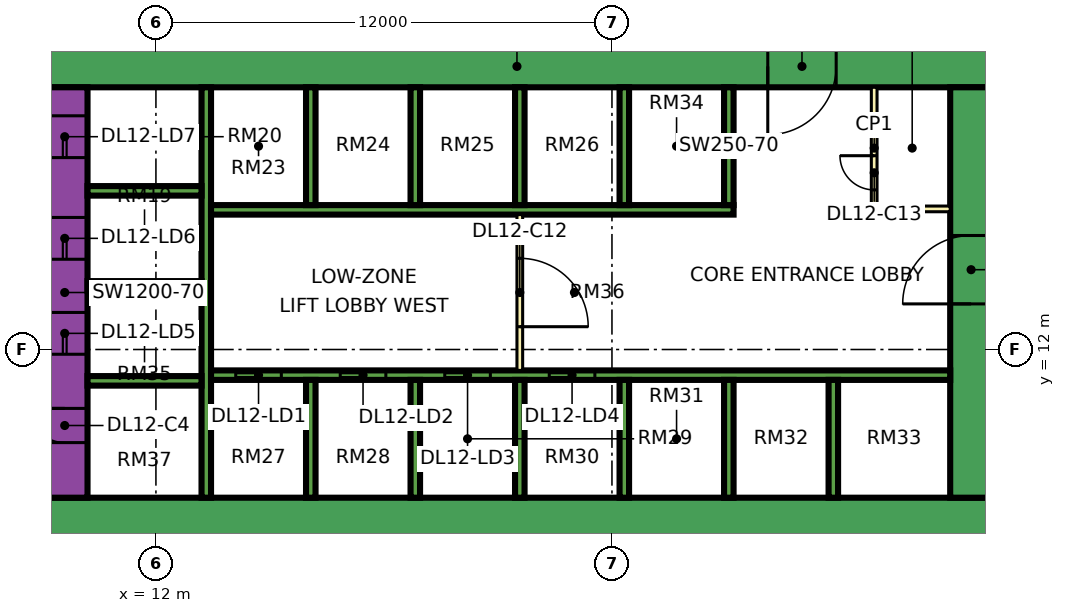
"""IFC4 building model, lengths in metres.
Left out: names, types, materials, properties, quantities, classifications, styles, units other than length and angle.
Written with IfcOpenShell. Run it as: python <this file> out.ifc"""

import sys

from ifc_helpers import new_model, si_unit, direction, frame, frame_2d, origin, place, context, subcontext, project, spatial, rectangle, extrude, element, fill, save


model = new_model("IFC4")
c1 = context("Model", 3, precision=1e-05, world=origin(), true_north=direction((0.0, 1.0)))
c2 = subcontext(c1, "Body", "Model", "MODEL_VIEW")
j1 = project(units=[si_unit("LENGTHUNIT", "METRE"), si_unit("PLANEANGLEUNIT", "RADIAN")], contexts=[c1])
p1 = place(None, origin())
s1 = spatial("IfcSite", under=j1, at=p1, CompositionType="ELEMENT")
p2 = place(p1, origin())
s2 = spatial("IfcBuilding", under=s1, at=p2, CompositionType="ELEMENT")
p3 = place(p2, frame((0.0, 0.0, 60.15)))
s3 = spatial("IfcBuildingStorey", under=s2, at=p3, CompositionType="ELEMENT", Elevation=60.15)
p4 = place(p3, frame((9.0, 7.55, 0.0), z_axis=(0.0, 0.0, 1.0), x_axis=(1.0, 0.0, 0.0)))
e1 = element("IfcWall", 1, at=p4, inside=s3, PredefinedType="SHEAR", context=c2, shape_type="SweptSolid", body=[
    extrude(rectangle(XDim=25.0, YDim=1.1, at=frame_2d((12.5, 0.0))), origin(), (0.0, 0.0, 1.0), 3.75),
])
p5 = place(p3, frame((9.0, 19.45, 0.0), z_axis=(0.0, 0.0, 1.0), x_axis=(1.0, 0.0, 0.0)))
e2 = element("IfcWall", 2, at=p5, inside=s3, PredefinedType="SHEAR", context=c2, shape_type="SweptSolid", body=[
    extrude(rectangle(XDim=25.0, YDim=1.1, at=frame_2d((12.5, 0.0))), origin(), (0.0, 0.0, 1.0), 3.75),
])
p6 = place(p5, frame((19.1, 0.0, 0.0)))
e3 = element("IfcOpeningElement", 3, at=p6, cuts=e2, PredefinedType="OPENING", context=c2, shape_type="SweptSolid", body=[
    extrude(rectangle(XDim=1.8, YDim=2.4, at=frame_2d((0.9, 1.2))), frame((0.0, 0.56, 0.0), z_axis=(0.0, -1.0, 0.0), x_axis=(1.0, 0.0, 0.0)), (0.0, 0.0, 1.0), 1.12),
])
p7 = place(p3, frame((9.6, 8.1, 0.0), z_axis=(0.0, 0.0, 1.0), x_axis=(0.0, 1.0, 0.0)))
e4 = element("IfcWall", 4, at=p7, inside=s3, PredefinedType="SHEAR", context=c2, shape_type="SweptSolid", body=[
    extrude(rectangle(XDim=10.8, YDim=1.2, at=frame_2d((5.4, 0.0))), origin(), (0.0, 0.0, 1.0), 3.75),
])
p8 = place(p7, frame((3.775, 0.0, 0.0)))
e5 = element("IfcOpeningElement", 5, at=p8, cuts=e4, PredefinedType="OPENING", context=c2, shape_type="SweptSolid", body=[
    extrude(rectangle(XDim=1.1, YDim=2.2, at=frame_2d((0.55, 1.1))), frame((0.0, 0.61, 0.0), z_axis=(0.0, -1.0, 0.0), x_axis=(1.0, 0.0, 0.0)), (0.0, 0.0, 1.0), 1.22),
])
p9 = place(p7, frame((6.275, 0.0, 0.0)))
e6 = element("IfcOpeningElement", 6, at=p9, cuts=e4, PredefinedType="OPENING", context=c2, shape_type="SweptSolid", body=[
    extrude(rectangle(XDim=1.1, YDim=2.2, at=frame_2d((0.55, 1.1))), frame((0.0, 0.61, 0.0), z_axis=(0.0, -1.0, 0.0), x_axis=(1.0, 0.0, 0.0)), (0.0, 0.0, 1.0), 1.22),
])
p10 = place(p7, frame((8.95, 0.0, 0.0)))
e7 = element("IfcOpeningElement", 7, at=p10, cuts=e4, PredefinedType="OPENING", context=c2, shape_type="SweptSolid", body=[
    extrude(rectangle(XDim=1.1, YDim=2.2, at=frame_2d((0.55, 1.1))), frame((0.0, 0.61, 0.0), z_axis=(0.0, -1.0, 0.0), x_axis=(1.0, 0.0, 0.0)), (0.0, 0.0, 1.0), 1.22),
])
p11 = place(p7, frame((1.45, 0.0, 0.0)))
e8 = element("IfcOpeningElement", 8, at=p11, cuts=e4, PredefinedType="OPENING", context=c2, shape_type="SweptSolid", body=[
    extrude(rectangle(XDim=0.9, YDim=2.1, at=frame_2d((0.45, 1.05))), frame((0.0, 0.61, 0.0), z_axis=(0.0, -1.0, 0.0), x_axis=(1.0, 0.0, 0.0)), (0.0, 0.0, 1.0), 1.22),
])
p12 = place(p3, frame((33.45, 8.1, 0.0), z_axis=(0.0, 0.0, 1.0), x_axis=(0.0, 1.0, 0.0)))
e9 = element("IfcWall", 9, at=p12, inside=s3, PredefinedType="SHEAR", context=c2, shape_type="SweptSolid", body=[
    extrude(rectangle(XDim=10.8, YDim=1.1, at=frame_2d((5.4, 0.0))), origin(), (0.0, 0.0, 1.0), 3.75),
])
p13 = place(p12, frame((5.1, 0.0, 0.0)))
e10 = element("IfcOpeningElement", 10, at=p13, cuts=e9, PredefinedType="OPENING", context=c2, shape_type="SweptSolid", body=[
    extrude(rectangle(XDim=1.8, YDim=2.4, at=frame_2d((0.9, 1.2))), frame((0.0, 0.56, 0.0), z_axis=(0.0, -1.0, 0.0), x_axis=(1.0, 0.0, 0.0)), (0.0, 0.0, 1.0), 1.12),
])
p14 = place(p3, frame((13.325, 8.1, 0.0), z_axis=(0.0, 0.0, 1.0), x_axis=(0.0, 1.0, 0.0)))
e11 = element("IfcWall", 11, at=p14, inside=s3, PredefinedType="SHEAR", context=c2, shape_type="SweptSolid", body=[
    extrude(rectangle(XDim=10.8, YDim=0.25, at=frame_2d((5.4, 0.0))), origin(), (0.0, 0.0, 1.0), 3.75),
])
p15 = place(p3, frame((13.45, 11.325, 0.0), z_axis=(0.0, 0.0, 1.0), x_axis=(1.0, 0.0, 0.0)))
e12 = element("IfcWall", 12, at=p15, inside=s3, PredefinedType="SHEAR", context=c2, shape_type="SweptSolid", body=[
    extrude(rectangle(XDim=19.45, YDim=0.25, at=frame_2d((9.725, 0.0))), origin(), (0.0, 0.0, 1.0), 3.75),
])
p16 = place(p15, frame((0.65, 0.0, 0.0)))
e13 = element("IfcOpeningElement", 13, at=p16, cuts=e12, PredefinedType="OPENING", context=c2, shape_type="SweptSolid", body=[
    extrude(rectangle(XDim=1.2, YDim=2.2, at=frame_2d((0.6, 1.1))), frame((0.0, 0.135, 0.0), z_axis=(0.0, -1.0, 0.0), x_axis=(1.0, 0.0, 0.0)), (0.0, 0.0, 1.0), 0.27),
])
p17 = place(p15, frame((3.4, 0.0, 0.0)))
e14 = element("IfcOpeningElement", 14, at=p17, cuts=e12, PredefinedType="OPENING", context=c2, shape_type="SweptSolid", body=[
    extrude(rectangle(XDim=1.2, YDim=2.2, at=frame_2d((0.6, 1.1))), frame((0.0, 0.135, 0.0), z_axis=(0.0, -1.0, 0.0), x_axis=(1.0, 0.0, 0.0)), (0.0, 0.0, 1.0), 0.27),
])
p18 = place(p15, frame((6.15, 0.0, 0.0)))
e15 = element("IfcOpeningElement", 15, at=p18, cuts=e12, PredefinedType="OPENING", context=c2, shape_type="SweptSolid", body=[
    extrude(rectangle(XDim=1.2, YDim=2.2, at=frame_2d((0.6, 1.1))), frame((0.0, 0.135, 0.0), z_axis=(0.0, -1.0, 0.0), x_axis=(1.0, 0.0, 0.0)), (0.0, 0.0, 1.0), 0.27),
])
p19 = place(p15, frame((8.9, 0.0, 0.0)))
e16 = element("IfcOpeningElement", 16, at=p19, cuts=e12, PredefinedType="OPENING", context=c2, shape_type="SweptSolid", body=[
    extrude(rectangle(XDim=1.2, YDim=2.2, at=frame_2d((0.6, 1.1))), frame((0.0, 0.135, 0.0), z_axis=(0.0, -1.0, 0.0), x_axis=(1.0, 0.0, 0.0)), (0.0, 0.0, 1.0), 0.27),
])
p20 = place(p3, frame((13.45, 15.675, 0.0), z_axis=(0.0, 0.0, 1.0), x_axis=(1.0, 0.0, 0.0)))
e17 = element("IfcWall", 17, at=p20, inside=s3, PredefinedType="SHEAR", context=c2, shape_type="SweptSolid", body=[
    extrude(rectangle(XDim=13.75, YDim=0.25, at=frame_2d((6.875, 0.0))), origin(), (0.0, 0.0, 1.0), 3.75),
])
for number, where, z_axis, x_axis in (
    (18, (10.2, 11.175, 0.0), (0.0, 0.0, 1.0), (1.0, 0.0, 0.0)),
    (19, (10.2, 13.675, 0.0), (0.0, 0.0, 1.0), (1.0, 0.0, 0.0)),
    (20, (10.2, 16.175, 0.0), (0.0, 0.0, 1.0), (1.0, 0.0, 0.0)),
):
    element("IfcWall", number, at=place(p3, frame(where, z_axis=z_axis, x_axis=x_axis)), inside=s3, PredefinedType="SHEAR", context=c2, shape_type="SweptSolid", body=[
        extrude(rectangle(XDim=3.0, YDim=0.25, at=frame_2d((1.5, 0.0))), origin(), (0.0, 0.0, 1.0), 3.75),
    ])
for number, where, z_axis, x_axis in (
    (21, (16.075, 8.1, 0.0), (0.0, 0.0, 1.0), (0.0, 1.0, 0.0)),
    (22, (18.825, 8.1, 0.0), (0.0, 0.0, 1.0), (0.0, 1.0, 0.0)),
    (23, (21.575, 8.1, 0.0), (0.0, 0.0, 1.0), (0.0, 1.0, 0.0)),
    (24, (24.325, 8.1, 0.0), (0.0, 0.0, 1.0), (0.0, 1.0, 0.0)),
    (25, (27.075, 8.1, 0.0), (0.0, 0.0, 1.0), (0.0, 1.0, 0.0)),
    (26, (29.825, 8.1, 0.0), (0.0, 0.0, 1.0), (0.0, 1.0, 0.0)),
    (27, (16.075, 15.8, 0.0), (0.0, 0.0, 1.0), (0.0, 1.0, 0.0)),
    (28, (18.825, 15.8, 0.0), (0.0, 0.0, 1.0), (0.0, 1.0, 0.0)),
    (29, (21.575, 15.8, 0.0), (0.0, 0.0, 1.0), (0.0, 1.0, 0.0)),
    (30, (24.325, 15.8, 0.0), (0.0, 0.0, 1.0), (0.0, 1.0, 0.0)),
    (31, (27.075, 15.8, 0.0), (0.0, 0.0, 1.0), (0.0, 1.0, 0.0)),
):
    element("IfcWall", number, at=place(p3, frame(where, z_axis=z_axis, x_axis=x_axis)), inside=s3, PredefinedType="SHEAR", context=c2, shape_type="SweptSolid", body=[
        extrude(rectangle(XDim=3.1, YDim=0.25, at=frame_2d((1.55, 0.0))), origin(), (0.0, 0.0, 1.0), 3.75),
    ])
p21 = place(p3, frame((-1.447, 12.553, 0.0), z_axis=(0.0, 0.0, 1.0), x_axis=(0.707106781187, -0.707106781187, 0.0)))
e32 = element("IfcWall", 32, at=p21, inside=s3, PredefinedType="SOLIDWALL", context=c2, shape_type="SweptSolid", body=[
    extrude(rectangle(XDim=19.799, YDim=0.15, at=frame_2d((9.899, 0.0))), origin(), (0.0, 0.0, 1.0), 3.35),
])
p22 = place(p21, frame((2.212, 0.0, 0.45)))
e33 = element("IfcOpeningElement", 33, at=p22, cuts=e32, PredefinedType="OPENING", context=c2, shape_type="SweptSolid", body=[
    extrude(rectangle(XDim=3.0, YDim=2.4, at=frame_2d((1.5, 1.2))), frame((0.0, 0.085, 0.0), z_axis=(0.0, -1.0, 0.0), x_axis=(1.0, 0.0, 0.0)), (0.0, 0.0, 1.0), 0.17),
])
p23 = place(p21, frame((10.216, 0.0, 0.45)))
e34 = element("IfcOpeningElement", 34, at=p23, cuts=e32, PredefinedType="OPENING", context=c2, shape_type="SweptSolid", body=[
    extrude(rectangle(XDim=3.0, YDim=2.4, at=frame_2d((1.5, 1.2))), frame((0.0, 0.085, 0.0), z_axis=(0.0, -1.0, 0.0), x_axis=(1.0, 0.0, 0.0)), (0.0, 0.0, 1.0), 0.17),
])
p24 = place(p3, frame((21.575, 11.45, 0.0), z_axis=(0.0, 0.0, 1.0), x_axis=(0.0, 1.0, 0.0)))
e35 = element("IfcWall", 35, at=p24, inside=s3, PredefinedType="PARTITIONING", context=c2, shape_type="SweptSolid", body=[
    extrude(rectangle(XDim=4.1, YDim=0.15, at=frame_2d((2.05, 0.0))), origin(), (0.0, 0.0, 1.0), 3.35),
])
p25 = place(p24, frame((1.15, 0.0, 0.0)))
e36 = element("IfcOpeningElement", 36, at=p25, cuts=e35, PredefinedType="OPENING", context=c2, shape_type="SweptSolid", body=[
    extrude(rectangle(XDim=1.8, YDim=2.4, at=frame_2d((0.9, 1.2))), frame((0.0, 0.085, 0.0), z_axis=(0.0, -1.0, 0.0), x_axis=(1.0, 0.0, 0.0)), (0.0, 0.0, 1.0), 0.17),
])
p26 = place(p3, frame((30.9, 15.7, 0.0), z_axis=(0.0, 0.0, 1.0), x_axis=(0.0, 1.0, 0.0)))
e37 = element("IfcWall", 37, at=p26, inside=s3, PredefinedType="PARTITIONING", context=c2, shape_type="SweptSolid", body=[
    extrude(rectangle(XDim=3.2, YDim=0.15, at=frame_2d((1.6, 0.0))), origin(), (0.0, 0.0, 1.0), 3.35),
])
p27 = place(p26, frame((0.5, 0.0, 0.0)))
e38 = element("IfcOpeningElement", 38, at=p27, cuts=e37, PredefinedType="OPENING", context=c2, shape_type="SweptSolid", body=[
    extrude(rectangle(XDim=0.9, YDim=2.1, at=frame_2d((0.45, 1.05))), frame((0.0, 0.085, 0.0), z_axis=(0.0, -1.0, 0.0), x_axis=(1.0, 0.0, 0.0)), (0.0, 0.0, 1.0), 0.17),
])
p28 = place(p3, frame((30.9, 15.7, 0.0), z_axis=(0.0, 0.0, 1.0), x_axis=(1.0, 0.0, 0.0)))
e39 = element("IfcWall", 39, at=p28, inside=s3, PredefinedType="PARTITIONING", context=c2, shape_type="SweptSolid", body=[
    extrude(rectangle(XDim=2.0, YDim=0.15, at=frame_2d((1.0, 0.0))), origin(), (0.0, 0.0, 1.0), 3.35),
])
p29 = place(p16, origin())
e40 = element("IfcDoor", 40, at=p29, inside=s3, OperationType="DOUBLE_DOOR_SLIDING", PredefinedType="DOOR", context=c2, shape_type="SweptSolid", body=[
    extrude(rectangle(XDim=1.2, YDim=2.2, at=frame_2d((0.6, 1.1))), frame((0.0, 0.025, 0.0), z_axis=(0.0, -1.0, 0.0), x_axis=(1.0, 0.0, 0.0)), (0.0, 0.0, 1.0), 0.05),
])
fill(e13, e40)
p30 = place(p17, origin())
e41 = element("IfcDoor", 41, at=p30, inside=s3, OperationType="DOUBLE_DOOR_SLIDING", PredefinedType="DOOR", context=c2, shape_type="SweptSolid", body=[
    extrude(rectangle(XDim=1.2, YDim=2.2, at=frame_2d((0.6, 1.1))), frame((0.0, 0.025, 0.0), z_axis=(0.0, -1.0, 0.0), x_axis=(1.0, 0.0, 0.0)), (0.0, 0.0, 1.0), 0.05),
])
fill(e14, e41)
p31 = place(p18, origin())
e42 = element("IfcDoor", 42, at=p31, inside=s3, OperationType="DOUBLE_DOOR_SLIDING", PredefinedType="DOOR", context=c2, shape_type="SweptSolid", body=[
    extrude(rectangle(XDim=1.2, YDim=2.2, at=frame_2d((0.6, 1.1))), frame((0.0, 0.025, 0.0), z_axis=(0.0, -1.0, 0.0), x_axis=(1.0, 0.0, 0.0)), (0.0, 0.0, 1.0), 0.05),
])
fill(e15, e42)
p32 = place(p19, origin())
e43 = element("IfcDoor", 43, at=p32, inside=s3, OperationType="DOUBLE_DOOR_SLIDING", PredefinedType="DOOR", context=c2, shape_type="SweptSolid", body=[
    extrude(rectangle(XDim=1.2, YDim=2.2, at=frame_2d((0.6, 1.1))), frame((0.0, 0.025, 0.0), z_axis=(0.0, -1.0, 0.0), x_axis=(1.0, 0.0, 0.0)), (0.0, 0.0, 1.0), 0.05),
])
fill(e16, e43)
p33 = place(p8, origin())
e44 = element("IfcDoor", 44, at=p33, inside=s3, OperationType="DOUBLE_DOOR_SLIDING", PredefinedType="DOOR", context=c2, shape_type="SweptSolid", body=[
    extrude(rectangle(XDim=1.1, YDim=2.2, at=frame_2d((0.55, 1.1))), frame((0.0, 0.025, 0.0), z_axis=(0.0, -1.0, 0.0), x_axis=(1.0, 0.0, 0.0)), (0.0, 0.0, 1.0), 0.05),
])
fill(e5, e44)
p34 = place(p9, origin())
e45 = element("IfcDoor", 45, at=p34, inside=s3, OperationType="DOUBLE_DOOR_SLIDING", PredefinedType="DOOR", context=c2, shape_type="SweptSolid", body=[
    extrude(rectangle(XDim=1.1, YDim=2.2, at=frame_2d((0.55, 1.1))), frame((0.0, 0.025, 0.0), z_axis=(0.0, -1.0, 0.0), x_axis=(1.0, 0.0, 0.0)), (0.0, 0.0, 1.0), 0.05),
])
fill(e6, e45)
p35 = place(p10, origin())
e46 = element("IfcDoor", 46, at=p35, inside=s3, OperationType="DOUBLE_DOOR_SLIDING", PredefinedType="DOOR", context=c2, shape_type="SweptSolid", body=[
    extrude(rectangle(XDim=1.1, YDim=2.2, at=frame_2d((0.55, 1.1))), frame((0.0, 0.025, 0.0), z_axis=(0.0, -1.0, 0.0), x_axis=(1.0, 0.0, 0.0)), (0.0, 0.0, 1.0), 0.05),
])
fill(e7, e46)
p36 = place(p13, origin())
e47 = element("IfcDoor", 47, at=p36, inside=s3, OperationType="DOUBLE_DOOR_SINGLE_SWING", PredefinedType="DOOR", context=c2, shape_type="SweptSolid", body=[
    extrude(rectangle(XDim=1.8, YDim=2.4, at=frame_2d((0.9, 1.2))), frame((0.0, 0.025, 0.0), z_axis=(0.0, -1.0, 0.0), x_axis=(1.0, 0.0, 0.0)), (0.0, 0.0, 1.0), 0.05),
])
fill(e10, e47)
p37 = place(p6, frame((1.8, 0.0, 0.0), z_axis=(0.0, 0.0, 1.0), x_axis=(-1.0, 0.0, 0.0)))
e48 = element("IfcDoor", 48, at=p37, inside=s3, OperationType="DOUBLE_DOOR_SINGLE_SWING", PredefinedType="DOOR", context=c2, shape_type="SweptSolid", body=[
    extrude(rectangle(XDim=1.8, YDim=2.4, at=frame_2d((0.9, 1.2))), frame((0.0, 0.025, 0.0), z_axis=(0.0, -1.0, 0.0), x_axis=(1.0, 0.0, 0.0)), (0.0, 0.0, 1.0), 0.05),
])
fill(e3, e48)
p38 = place(p11, frame((0.9, 0.0, 0.0), z_axis=(0.0, 0.0, 1.0), x_axis=(-1.0, 0.0, 0.0)))
e49 = element("IfcDoor", 49, at=p38, inside=s3, OperationType="SINGLE_SWING_RIGHT", PredefinedType="DOOR", context=c2, shape_type="SweptSolid", body=[
    extrude(rectangle(XDim=0.9, YDim=2.1, at=frame_2d((0.45, 1.05))), frame((0.0, 0.025, 0.0), z_axis=(0.0, -1.0, 0.0), x_axis=(1.0, 0.0, 0.0)), (0.0, 0.0, 1.0), 0.05),
])
fill(e8, e49)
p39 = place(p25, frame((1.8, 0.0, 0.0), z_axis=(0.0, 0.0, 1.0), x_axis=(-1.0, 0.0, 0.0)))
e50 = element("IfcDoor", 50, at=p39, inside=s3, OperationType="DOUBLE_DOOR_SINGLE_SWING", PredefinedType="DOOR", context=c2, shape_type="SweptSolid", body=[
    extrude(rectangle(XDim=1.8, YDim=2.4, at=frame_2d((0.9, 1.2))), frame((0.0, 0.025, 0.0), z_axis=(0.0, -1.0, 0.0), x_axis=(1.0, 0.0, 0.0)), (0.0, 0.0, 1.0), 0.05),
])
fill(e36, e50)
p40 = place(p27, frame((0.9, 0.0, 0.0), z_axis=(0.0, 0.0, 1.0), x_axis=(-1.0, 0.0, 0.0)))
e51 = element("IfcDoor", 51, at=p40, inside=s3, OperationType="SINGLE_SWING_RIGHT", PredefinedType="DOOR", context=c2, shape_type="SweptSolid", body=[
    extrude(rectangle(XDim=0.9, YDim=2.1, at=frame_2d((0.45, 1.05))), frame((0.0, 0.025, 0.0), z_axis=(0.0, -1.0, 0.0), x_axis=(1.0, 0.0, 0.0)), (0.0, 0.0, 1.0), 0.05),
])
fill(e38, e51)
save(model, sys.argv[1])
